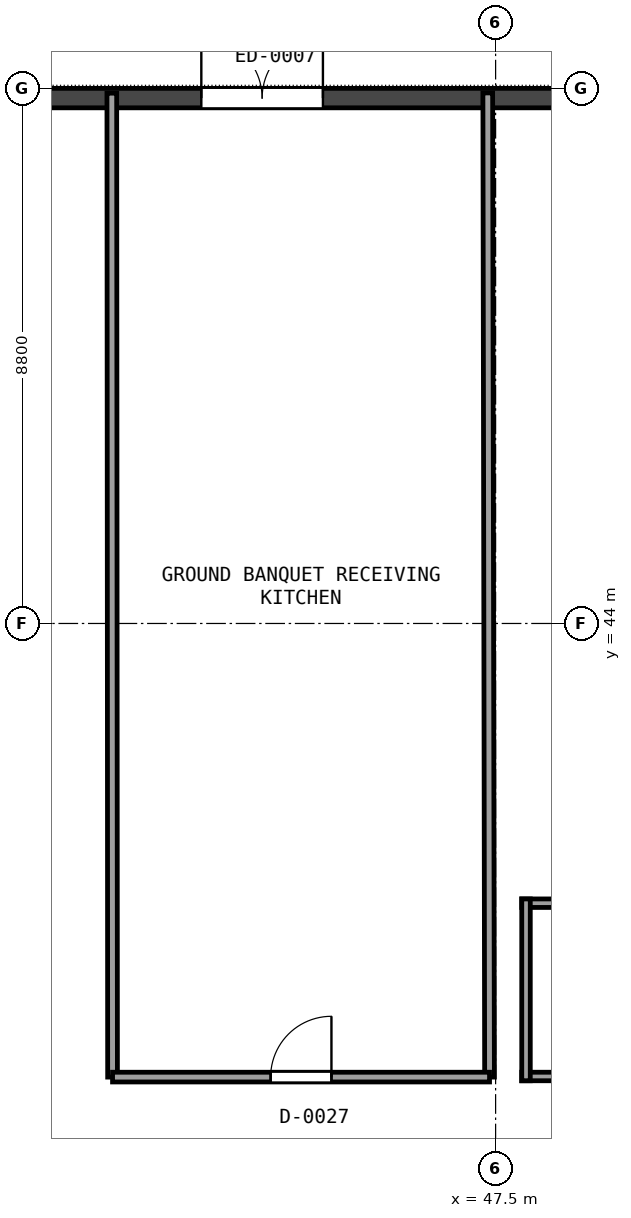
"""IFC4 building model, lengths in metres.
Left out: names, types, materials, properties, quantities, classifications, styles, units other than length and angle.
Written with IfcOpenShell. Run it as: python <this file> out.ifc"""

import sys

from ifc_helpers import new_model, si_unit, direction, frame, frame_2d, origin, place, context, subcontext, project, spatial, rectangle, extrude, element, fill, save


model = new_model("IFC4")
c1 = context("Model", 3, precision=1e-05, world=origin(), true_north=direction((0.0, 1.0)))
c2 = subcontext(c1, "Body", "Model", "MODEL_VIEW")
j1 = project(units=[si_unit("LENGTHUNIT", "METRE"), si_unit("PLANEANGLEUNIT", "RADIAN")], contexts=[c1])
p1 = place(None, origin())
s1 = spatial("IfcSite", under=j1, at=p1, CompositionType="ELEMENT")
p2 = place(p1, origin())
s2 = spatial("IfcBuilding", under=s1, at=p2, CompositionType="ELEMENT")
p3 = place(p2, origin())
s3 = spatial("IfcBuildingStorey", under=s2, at=p3, CompositionType="ELEMENT", Elevation=0.0)
p4 = place(p3, frame((0.16, 52.64, 0.0), z_axis=(0.0, 0.0, 1.0), x_axis=(1.0, 0.0, 0.0)))
e1 = element("IfcWall", 1, at=p4, inside=s3, PredefinedType="SOLIDWALL", context=c2, shape_type="SweptSolid", body=[
    extrude(rectangle(XDim=75.68, YDim=0.32, at=frame_2d((37.84, 0.0))), origin(), (0.0, 0.0, 1.0), 5.05),
])
p5 = place(p4, frame((15.0, 0.0, 0.0)))
e2 = element("IfcOpeningElement", 2, at=p5, cuts=e1, PredefinedType="OPENING", context=c2, shape_type="SweptSolid", body=[
    extrude(rectangle(XDim=2.0, YDim=2.4, at=frame_2d((1.0, 1.2))), frame((0.0, 0.17, 0.0), z_axis=(0.0, -1.0, 0.0), x_axis=(1.0, 0.0, 0.0)), (0.0, 0.0, 1.0), 0.34),
])
p6 = place(p4, frame((29.5, 0.0, 0.0)))
e3 = element("IfcOpeningElement", 3, at=p6, cuts=e1, PredefinedType="OPENING", context=c2, shape_type="SweptSolid", body=[
    extrude(rectangle(XDim=2.0, YDim=2.4, at=frame_2d((1.0, 1.2))), frame((0.0, 0.17, 0.0), z_axis=(0.0, -1.0, 0.0), x_axis=(1.0, 0.0, 0.0)), (0.0, 0.0, 1.0), 0.34),
])
p7 = place(p4, frame((42.5, 0.0, 0.0)))
e4 = element("IfcOpeningElement", 4, at=p7, cuts=e1, PredefinedType="OPENING", context=c2, shape_type="SweptSolid", body=[
    extrude(rectangle(XDim=2.0, YDim=2.4, at=frame_2d((1.0, 1.2))), frame((0.0, 0.17, 0.0), z_axis=(0.0, -1.0, 0.0), x_axis=(1.0, 0.0, 0.0)), (0.0, 0.0, 1.0), 0.34),
])
p8 = place(p4, frame((58.0, 0.0, 0.0)))
e5 = element("IfcOpeningElement", 5, at=p8, cuts=e1, PredefinedType="OPENING", context=c2, shape_type="SweptSolid", body=[
    extrude(rectangle(XDim=2.0, YDim=2.4, at=frame_2d((1.0, 1.2))), frame((0.0, 0.17, 0.0), z_axis=(0.0, -1.0, 0.0), x_axis=(1.0, 0.0, 0.0)), (0.0, 0.0, 1.0), 0.34),
])
p9 = place(p3, frame((47.93, 36.55, 0.0), z_axis=(0.0, 0.0, 1.0), x_axis=(1.0, 0.0, 0.0)))
e6 = element("IfcWall", 6, at=p9, inside=s3, PredefinedType="PARTITIONING", context=c2, shape_type="SweptSolid", body=[
    extrude(rectangle(XDim=2.94, YDim=0.14, at=frame_2d((1.47, 0.0))), origin(), (0.0, 0.0, 1.0), 4.135),
])
p10 = place(p9, frame((1.01, 0.0, 0.0)))
e7 = element("IfcOpeningElement", 7, at=p10, cuts=e6, PredefinedType="OPENING", context=c2, shape_type="SweptSolid", body=[
    extrude(rectangle(XDim=0.92, YDim=2.1, at=frame_2d((0.46, 1.05))), frame((0.0, 0.08, 0.0), z_axis=(0.0, -1.0, 0.0), x_axis=(1.0, 0.0, 0.0)), (0.0, 0.0, 1.0), 0.16),
])
p11 = place(p3, frame((50.87, 39.4, 0.0), z_axis=(0.0, 0.0, 1.0), x_axis=(-1.0, 0.0, 0.0)))
e8 = element("IfcWall", 8, at=p11, inside=s3, PredefinedType="PARTITIONING", context=c2, shape_type="SweptSolid", body=[
    extrude(rectangle(XDim=2.94, YDim=0.14, at=frame_2d((1.47, 0.0))), origin(), (0.0, 0.0, 1.0), 4.135),
])
p12 = place(p3, frame((48.0, 39.47, 0.0), z_axis=(0.0, 0.0, 1.0), x_axis=(0.0, -1.0, 0.0)))
e9 = element("IfcWall", 9, at=p12, inside=s3, PredefinedType="PARTITIONING", context=c2, shape_type="SweptSolid", body=[
    extrude(rectangle(XDim=2.99, YDim=0.14, at=frame_2d((1.495, 0.0))), origin(), (0.0, 0.0, 1.0), 4.135),
])
p13 = place(p3, frame((47.4, 36.54, 0.0), z_axis=(0.0, 0.0, 1.0), x_axis=(-0.0017799471, 0.999998415893, 0.0)))
e10 = element("IfcWall", 10, at=p13, inside=s3, PredefinedType="PARTITIONING", context=c2, shape_type="SweptSolid", body=[
    extrude(rectangle(XDim=16.185, YDim=0.16, at=frame_2d((8.093, 0.0))), origin(), (0.0, 0.0, 1.0), 4.123),
])
p14 = place(p3, frame((41.188, 52.721, 0.0), z_axis=(0.0, 0.0, 1.0), x_axis=(0.000739321131, -0.999999726702, 0.0)))
e11 = element("IfcWall", 11, at=p14, inside=s3, PredefinedType="PARTITIONING", context=c2, shape_type="SweptSolid", body=[
    extrude(rectangle(XDim=16.181, YDim=0.16, at=frame_2d((8.09, 0.0))), origin(), (0.0, 0.0, 1.0), 4.123),
])
p15 = place(p3, frame((41.2, 36.54, 0.0), z_axis=(0.0, 0.0, 1.0), x_axis=(1.0, 0.0, 0.0)))
e12 = element("IfcWall", 12, at=p15, inside=s3, PredefinedType="PARTITIONING", context=c2, shape_type="SweptSolid", body=[
    extrude(rectangle(XDim=6.2, YDim=0.16, at=frame_2d((3.1, 0.0))), origin(), (0.0, 0.0, 1.0), 5.05),
])
p16 = place(p15, frame((2.6, 0.0, 0.0)))
e13 = element("IfcOpeningElement", 13, at=p16, cuts=e12, PredefinedType="OPENING", context=c2, shape_type="SweptSolid", body=[
    extrude(rectangle(XDim=1.0, YDim=2.15, at=frame_2d((0.5, 1.075))), frame((0.0, 0.09, 0.0), z_axis=(0.0, -1.0, 0.0), x_axis=(1.0, 0.0, 0.0)), (0.0, 0.0, 1.0), 0.18),
])
p17 = place(p7, origin())
e14 = element("IfcDoor", 14, at=p17, inside=s3, OperationType="DOUBLE_DOOR_SINGLE_SWING", PredefinedType="DOOR", context=c2, shape_type="SweptSolid", body=[
    extrude(rectangle(XDim=2.0, YDim=2.4, at=frame_2d((1.0, 1.2))), frame((0.0, 0.025, 0.0), z_axis=(0.0, -1.0, 0.0), x_axis=(1.0, 0.0, 0.0)), (0.0, 0.0, 1.0), 0.05),
])
fill(e4, e14)
p18 = place(p16, origin())
e15 = element("IfcDoor", 15, at=p18, inside=s3, OperationType="SINGLE_SWING_RIGHT", PredefinedType="DOOR", context=c2, shape_type="SweptSolid", body=[
    extrude(rectangle(XDim=1.0, YDim=2.15, at=frame_2d((0.5, 1.075))), frame((0.0, 0.025, 0.0), z_axis=(0.0, -1.0, 0.0), x_axis=(1.0, 0.0, 0.0)), (0.0, 0.0, 1.0), 0.05),
])
fill(e13, e15)
save(model, sys.argv[1])
